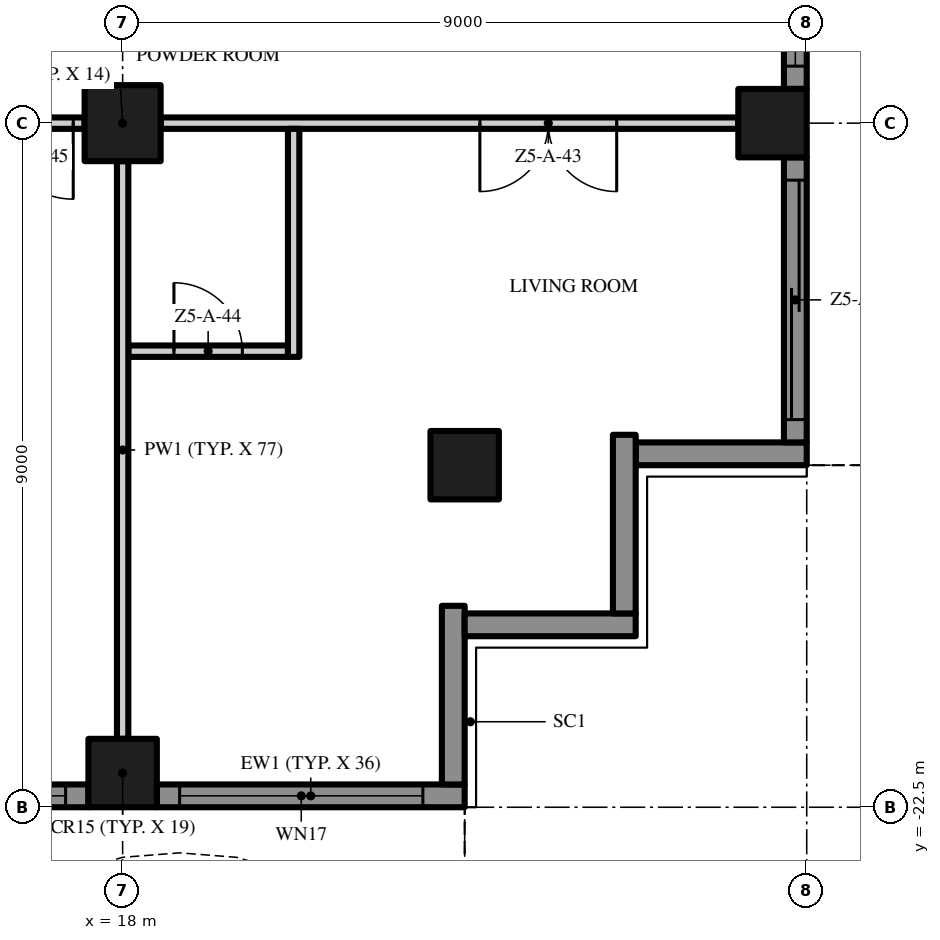
"""IFC4 building model, lengths in metres.
Left out: names, types, materials, properties, quantities, classifications, styles, units other than length and angle.
Written with IfcOpenShell. Run it as: python <this file> out.ifc"""

import sys

from ifc_helpers import new_model, si_unit, direction, frame, frame_2d, origin, origin_2d, place, context, subcontext, project, spatial, polyline, rectangle, outline, extrude, element, fill, save


model = new_model("IFC4")
c1 = context("Model", 3, precision=1e-05, world=origin(), true_north=direction((0.0, 1.0)))
c2 = subcontext(c1, "Body", "Model", "MODEL_VIEW")
j1 = project(units=[si_unit("LENGTHUNIT", "METRE"), si_unit("PLANEANGLEUNIT", "RADIAN")], contexts=[c1])
p1 = place(None, origin())
s1 = spatial("IfcSite", under=j1, at=p1, CompositionType="ELEMENT")
p2 = place(p1, origin())
s2 = spatial("IfcBuilding", under=s1, at=p2, CompositionType="ELEMENT")
p3 = place(p2, frame((0.0, 0.0, 242.6)))
s3 = spatial("IfcBuildingStorey", under=s2, at=p3, CompositionType="ELEMENT", Elevation=242.6)
p4 = place(p3, frame((18.0, -13.5, 0.0), z_axis=(0.0, 0.0, 1.0), x_axis=(1.0, 0.0, 0.0)))
e1 = element("IfcColumn", 1, at=p4, inside=s3, PredefinedType="COLUMN", context=c2, shape_type="SweptSolid", body=[
    extrude(rectangle(XDim=1.0, YDim=1.0, at=origin_2d()), origin(), (0.0, 0.0, 1.0), 3.5),
])
for number, where, z_axis, x_axis in (
    (2, (18.0, -22.05, 0.0), (0.0, 0.0, 1.0), (1.0, 0.0, 0.0)),
    (3, (26.55, -13.5, 0.0), (0.0, 0.0, 1.0), (1.0, 0.0, 0.0)),
    (4, (22.5, -18.0, 0.0), (0.0, 0.0, 1.0), (1.0, 0.0, 0.0)),
):
    element("IfcColumn", number, at=place(p3, frame(where, z_axis=z_axis, x_axis=x_axis)), inside=s3, PredefinedType="COLUMN", context=c2, shape_type="SweptSolid", body=[
        extrude(rectangle(XDim=0.9, YDim=0.9, at=origin_2d()), origin(), (0.0, 0.0, 1.0), 3.5),
    ])
p5 = place(p3, frame((17.55, -22.35, 0.0), z_axis=(0.0, 0.0, 1.0), x_axis=(-1.0, 0.0, 0.0)))
e5 = element("IfcWall", 5, at=p5, inside=s3, PredefinedType="SOLIDWALL", context=c2, shape_type="SweptSolid", body=[
    extrude(rectangle(XDim=8.1, YDim=0.3, at=frame_2d((4.05, 0.0))), origin(), (0.0, 0.0, 1.0), 3.5),
])
p6 = place(p5, frame((4.6, 0.0, 0.0)))
e6 = element("IfcOpeningElement", 6, at=p6, cuts=e5, PredefinedType="OPENING", context=c2, shape_type="SweptSolid", body=[
    extrude(rectangle(XDim=3.2, YDim=2.4, at=frame_2d((1.6, 1.2))), frame((0.0, 0.16, 0.0), z_axis=(0.0, -1.0, 0.0), x_axis=(1.0, 0.0, 0.0)), (0.0, 0.0, 1.0), 0.32),
])
p7 = place(p5, frame((0.3, 0.0, 0.45)))
e7 = element("IfcOpeningElement", 7, at=p7, cuts=e5, PredefinedType="OPENING", context=c2, shape_type="SweptSolid", body=[
    extrude(rectangle(XDim=3.2, YDim=2.65, at=frame_2d((1.6, 1.325))), frame((0.0, 0.16, 0.0), z_axis=(0.0, -1.0, 0.0), x_axis=(1.0, 0.0, 0.0)), (0.0, 0.0, 1.0), 0.32),
])
p8 = place(p3, frame((22.5, -22.35, 0.0), z_axis=(0.0, 0.0, 1.0), x_axis=(-1.0, 0.0, 0.0)))
e8 = element("IfcWall", 8, at=p8, inside=s3, PredefinedType="SOLIDWALL", context=c2, shape_type="SweptSolid", body=[
    extrude(rectangle(XDim=4.05, YDim=0.3, at=frame_2d((2.025, 0.0))), origin(), (0.0, 0.0, 1.0), 3.5),
])
p9 = place(p8, frame((0.55, 0.0, 0.45)))
e9 = element("IfcOpeningElement", 9, at=p9, cuts=e8, PredefinedType="OPENING", context=c2, shape_type="SweptSolid", body=[
    extrude(rectangle(XDim=3.2, YDim=2.65, at=frame_2d((1.6, 1.325))), frame((0.0, 0.16, 0.0), z_axis=(0.0, -1.0, 0.0), x_axis=(1.0, 0.0, 0.0)), (0.0, 0.0, 1.0), 0.32),
])
p10 = place(p3, frame((22.35, -19.85, 0.0), z_axis=(0.0, 0.0, 1.0), x_axis=(0.0, -1.0, 0.0)))
e10 = element("IfcWall", 10, at=p10, inside=s3, PredefinedType="SOLIDWALL", context=c2, shape_type="SweptSolid", body=[
    extrude(rectangle(XDim=2.35, YDim=0.3, at=frame_2d((1.175, 0.0))), origin(), (0.0, 0.0, 1.0), 3.5),
])
p11 = place(p3, frame((24.75, -20.1, 0.0), z_axis=(0.0, 0.0, 1.0), x_axis=(-1.0, 0.0, 0.0)))
e11 = element("IfcWall", 11, at=p11, inside=s3, PredefinedType="SOLIDWALL", context=c2, shape_type="SweptSolid", body=[
    extrude(rectangle(XDim=2.25, YDim=0.3, at=frame_2d((1.125, 0.0))), origin(), (0.0, 0.0, 1.0), 3.5),
])
p12 = place(p3, frame((24.6, -17.6, 0.0), z_axis=(0.0, 0.0, 1.0), x_axis=(0.0, -1.0, 0.0)))
e12 = element("IfcWall", 12, at=p12, inside=s3, PredefinedType="SOLIDWALL", context=c2, shape_type="SweptSolid", body=[
    extrude(rectangle(XDim=2.35, YDim=0.3, at=frame_2d((1.175, 0.0))), origin(), (0.0, 0.0, 1.0), 3.5),
])
p13 = place(p3, frame((27.0, -17.85, 0.0), z_axis=(0.0, 0.0, 1.0), x_axis=(-1.0, 0.0, 0.0)))
e13 = element("IfcWall", 13, at=p13, inside=s3, PredefinedType="SOLIDWALL", context=c2, shape_type="SweptSolid", body=[
    extrude(rectangle(XDim=2.25, YDim=0.3, at=frame_2d((1.125, 0.0))), origin(), (0.0, 0.0, 1.0), 3.5),
])
p14 = place(p3, frame((26.85, -13.95, 0.0), z_axis=(0.0, 0.0, 1.0), x_axis=(0.0, -1.0, 0.0)))
e14 = element("IfcWall", 14, at=p14, inside=s3, PredefinedType="SOLIDWALL", context=c2, shape_type="SweptSolid", body=[
    extrude(rectangle(XDim=3.75, YDim=0.3, at=frame_2d((1.875, 0.0))), origin(), (0.0, 0.0, 1.0), 3.5),
])
p15 = place(p14, frame((0.3, 0.0, 0.0)))
e15 = element("IfcOpeningElement", 15, at=p15, cuts=e14, PredefinedType="OPENING", context=c2, shape_type="SweptSolid", body=[
    extrude(rectangle(XDim=3.15, YDim=2.4, at=frame_2d((1.575, 1.2))), frame((0.0, 0.16, 0.0), z_axis=(0.0, -1.0, 0.0), x_axis=(1.0, 0.0, 0.0)), (0.0, 0.0, 1.0), 0.32),
])
p16 = place(p3, frame((26.85, -4.95, 0.0), z_axis=(0.0, 0.0, 1.0), x_axis=(0.0, -1.0, 0.0)))
e16 = element("IfcWall", 16, at=p16, inside=s3, PredefinedType="SOLIDWALL", context=c2, shape_type="SweptSolid", body=[
    extrude(rectangle(XDim=8.1, YDim=0.3, at=frame_2d((4.05, 0.0))), origin(), (0.0, 0.0, 1.0), 3.5),
])
p17 = place(p16, frame((4.6, 0.0, 0.45)))
e17 = element("IfcOpeningElement", 17, at=p17, cuts=e16, PredefinedType="OPENING", context=c2, shape_type="SweptSolid", body=[
    extrude(rectangle(XDim=3.2, YDim=2.65, at=frame_2d((1.6, 1.325))), frame((0.0, 0.16, 0.0), z_axis=(0.0, -1.0, 0.0), x_axis=(1.0, 0.0, 0.0)), (0.0, 0.0, 1.0), 0.32),
])
p18 = place(p16, frame((0.3, 0.0, 0.45)))
e18 = element("IfcOpeningElement", 18, at=p18, cuts=e16, PredefinedType="OPENING", context=c2, shape_type="SweptSolid", body=[
    extrude(rectangle(XDim=3.2, YDim=2.65, at=frame_2d((1.6, 1.325))), frame((0.0, 0.16, 0.0), z_axis=(0.0, -1.0, 0.0), x_axis=(1.0, 0.0, 0.0)), (0.0, 0.0, 1.0), 0.32),
])
p19 = place(p3, origin())
e19 = element("IfcWall", 19, at=p19, inside=s3, PredefinedType="USERDEFINED", context=c2, shape_type="SweptSolid", body=[
    extrude(outline(polyline([(-22.5, -24.3), (-21.0, -25.005), (-19.5, -25.441), (-18.75, -25.5), (-18.0, -25.441), (-16.5, -25.005), (-15.0, -24.3), (-13.5, -23.595), (-12.0, -23.159), (-11.25, -23.1), (-10.5, -23.159), (-9.0, -23.595), (-7.5, -24.3), (-6.0, -25.005), (-4.5, -25.441), (-3.75, -25.5), (-3.0, -25.441), (-1.5, -25.005), (0.0, -24.3), (1.5, -23.595), (3.0, -23.159), (3.75, -23.1), (4.5, -23.159), (6.0, -23.595), (7.5, -24.3), (9.0, -25.005), (10.5, -25.441), (11.25, -25.5), (12.0, -25.441), (13.5, -25.005), (15.0, -24.3), (16.5, -23.595), (18.0, -23.159), (18.75, -23.1), (19.5, -23.159), (21.0, -23.595), (22.5, -24.3), (22.606, -24.074), (21.089, -23.36), (19.545, -22.911), (18.75, -22.849), (17.955, -22.911), (16.411, -23.36), (14.894, -24.074), (13.411, -24.771), (11.955, -25.194), (11.25, -25.249), (10.545, -25.194), (9.089, -24.771), (7.606, -24.074), (6.089, -23.36), (4.545, -22.911), (3.75, -22.849), (2.955, -22.911), (1.411, -23.36), (-0.106, -24.074), (-1.589, -24.771), (-3.045, -25.194), (-3.75, -25.249), (-4.455, -25.194), (-5.911, -24.771), (-7.394, -24.074), (-8.911, -23.36), (-10.455, -22.911), (-11.25, -22.849), (-12.045, -22.911), (-13.589, -23.36), (-15.106, -24.074), (-16.589, -24.771), (-18.045, -25.194), (-18.75, -25.249), (-19.455, -25.194), (-20.911, -24.771), (-22.394, -24.074), (-22.5, -24.3)])), origin(), (0.0, 0.0, 1.0), 0.9),
])
p20 = place(p3, origin())
e20 = element("IfcWall", 20, at=p20, inside=s3, PredefinedType="USERDEFINED", context=c2, shape_type="SweptSolid", body=[
    extrude(outline(polyline([(28.8, -18.0), (29.505, -16.5), (29.941, -15.0), (30.0, -14.25), (29.941, -13.5), (29.505, -12.0), (28.8, -10.5), (28.095, -9.0), (27.659, -7.5), (27.6, -6.75), (27.659, -6.0), (28.095, -4.5), (28.8, -3.0), (29.505, -1.5), (29.941, 0.0), (30.0, 0.75), (29.941, 1.5), (29.505, 3.0), (28.8, 4.5), (28.095, 6.0), (27.659, 7.5), (27.6, 8.25), (27.659, 9.0), (28.095, 10.5), (28.8, 12.0), (29.505, 13.5), (29.941, 15.0), (30.0, 15.75), (29.941, 16.5), (29.505, 18.0), (29.265, 17.93), (29.694, 16.455), (29.749, 15.75), (29.694, 15.045), (29.271, 13.589), (28.574, 12.106), (27.86, 10.589), (27.411, 9.045), (27.349, 8.25), (27.411, 7.455), (27.86, 5.911), (28.574, 4.394), (29.271, 2.911), (29.694, 1.455), (29.749, 0.75), (29.694, 0.045), (29.271, -1.411), (28.574, -2.894), (27.86, -4.411), (27.411, -5.955), (27.349, -6.75), (27.411, -7.545), (27.86, -9.089), (28.574, -10.606), (29.271, -12.089), (29.694, -13.545), (29.749, -14.25), (29.694, -14.955), (29.271, -16.411), (28.574, -17.894), (28.8, -18.0)])), origin(), (0.0, 0.0, 1.0), 0.9),
])
p21 = place(p3, frame((18.075, -16.5, 0.0), z_axis=(0.0, 0.0, 1.0), x_axis=(1.0, 0.0, 0.0)))
e21 = element("IfcWall", 21, at=p21, inside=s3, PredefinedType="PARTITIONING", context=c2, shape_type="SweptSolid", body=[
    extrude(rectangle(XDim=2.1, YDim=0.15, at=frame_2d((1.05, 0.0))), origin(), (0.0, 0.0, 1.0), 3.5),
])
p22 = place(p21, frame((0.6, 0.0, 0.0)))
e22 = element("IfcOpeningElement", 22, at=p22, cuts=e21, PredefinedType="OPENING", context=c2, shape_type="SweptSolid", body=[
    extrude(rectangle(XDim=0.9, YDim=2.1, at=frame_2d((0.45, 1.05))), frame((0.0, 0.085, 0.0), z_axis=(0.0, -1.0, 0.0), x_axis=(1.0, 0.0, 0.0)), (0.0, 0.0, 1.0), 0.17),
])
p23 = place(p3, frame((17.5, -13.5, 0.0), z_axis=(0.0, 0.0, 1.0), x_axis=(-1.0, 0.0, 0.0)))
e23 = element("IfcWall", 23, at=p23, inside=s3, PredefinedType="PARTITIONING", context=c2, shape_type="SweptSolid", body=[
    extrude(rectangle(XDim=8.0, YDim=0.15, at=frame_2d((4.0, 0.0))), origin(), (0.0, 0.0, 1.0), 3.5),
])
p24 = place(p23, frame((0.15, 0.0, 0.0)))
e24 = element("IfcOpeningElement", 24, at=p24, cuts=e23, PredefinedType="OPENING", context=c2, shape_type="SweptSolid", body=[
    extrude(rectangle(XDim=1.0, YDim=2.4, at=frame_2d((0.5, 1.2))), frame((0.0, 0.085, 0.0), z_axis=(0.0, -1.0, 0.0), x_axis=(1.0, 0.0, 0.0)), (0.0, 0.0, 1.0), 0.17),
])
p25 = place(p23, frame((6.85, 0.0, 0.0)))
e25 = element("IfcOpeningElement", 25, at=p25, cuts=e23, PredefinedType="OPENING", context=c2, shape_type="SweptSolid", body=[
    extrude(rectangle(XDim=1.0, YDim=2.4, at=frame_2d((0.5, 1.2))), frame((0.0, 0.085, 0.0), z_axis=(0.0, -1.0, 0.0), x_axis=(1.0, 0.0, 0.0)), (0.0, 0.0, 1.0), 0.17),
])
p26 = place(p3, frame((26.1, -13.5, 0.0), z_axis=(0.0, 0.0, 1.0), x_axis=(-1.0, 0.0, 0.0)))
e26 = element("IfcWall", 26, at=p26, inside=s3, PredefinedType="PARTITIONING", context=c2, shape_type="SweptSolid", body=[
    extrude(rectangle(XDim=7.6, YDim=0.15, at=frame_2d((3.8, 0.0))), origin(), (0.0, 0.0, 1.0), 3.5),
])
p27 = place(p26, frame((1.6, 0.0, 0.0)))
e27 = element("IfcOpeningElement", 27, at=p27, cuts=e26, PredefinedType="OPENING", context=c2, shape_type="SweptSolid", body=[
    extrude(rectangle(XDim=1.8, YDim=2.4, at=frame_2d((0.9, 1.2))), frame((0.0, 0.085, 0.0), z_axis=(0.0, -1.0, 0.0), x_axis=(1.0, 0.0, 0.0)), (0.0, 0.0, 1.0), 0.17),
])
p28 = place(p3, frame((18.0, -21.6, 0.0), z_axis=(0.0, 0.0, 1.0), x_axis=(0.0, 1.0, 0.0)))
e28 = element("IfcWall", 28, at=p28, inside=s3, PredefinedType="PARTITIONING", context=c2, shape_type="SweptSolid", body=[
    extrude(rectangle(XDim=7.6, YDim=0.15, at=frame_2d((3.8, 0.0))), origin(), (0.0, 0.0, 1.0), 3.5),
])
p29 = place(p3, frame((20.25, -16.575, 0.0), z_axis=(0.0, 0.0, 1.0), x_axis=(0.0, 1.0, 0.0)))
e29 = element("IfcWall", 29, at=p29, inside=s3, PredefinedType="PARTITIONING", context=c2, shape_type="SweptSolid", body=[
    extrude(rectangle(XDim=3.0, YDim=0.15, at=frame_2d((1.5, 0.0))), origin(), (0.0, 0.0, 1.0), 3.5),
])
p30 = place(p7, origin())
e30 = element("IfcWindow", 30, at=p30, inside=s3, PartitioningType="SINGLE_PANEL", PredefinedType="WINDOW", context=c2, shape_type="SweptSolid", body=[
    extrude(rectangle(XDim=3.2, YDim=2.65, at=frame_2d((1.6, 1.325))), frame((0.0, 0.03, 0.0), z_axis=(0.0, -1.0, 0.0), x_axis=(1.0, 0.0, 0.0)), (0.0, 0.0, 1.0), 0.06),
])
fill(e7, e30)
p31 = place(p9, origin())
e31 = element("IfcWindow", 31, at=p31, inside=s3, PartitioningType="SINGLE_PANEL", PredefinedType="WINDOW", context=c2, shape_type="SweptSolid", body=[
    extrude(rectangle(XDim=3.2, YDim=2.65, at=frame_2d((1.6, 1.325))), frame((0.0, 0.03, 0.0), z_axis=(0.0, -1.0, 0.0), x_axis=(1.0, 0.0, 0.0)), (0.0, 0.0, 1.0), 0.06),
])
fill(e9, e31)
p32 = place(p15, origin())
e32 = element("IfcDoor", 32, at=p32, inside=s3, OperationType="SINGLE_SWING_LEFT", PredefinedType="DOOR", context=c2, shape_type="SweptSolid", body=[
    extrude(rectangle(XDim=3.15, YDim=2.4, at=frame_2d((1.575, 1.2))), frame((0.0, 0.025, 0.0), z_axis=(0.0, -1.0, 0.0), x_axis=(1.0, 0.0, 0.0)), (0.0, 0.0, 1.0), 0.05),
])
fill(e15, e32)
p33 = place(p17, origin())
e33 = element("IfcWindow", 33, at=p33, inside=s3, PartitioningType="SINGLE_PANEL", PredefinedType="WINDOW", context=c2, shape_type="SweptSolid", body=[
    extrude(rectangle(XDim=3.2, YDim=2.65, at=frame_2d((1.6, 1.325))), frame((0.0, 0.03, 0.0), z_axis=(0.0, -1.0, 0.0), x_axis=(1.0, 0.0, 0.0)), (0.0, 0.0, 1.0), 0.06),
])
fill(e17, e33)
p34 = place(p27, origin())
e34 = element("IfcDoor", 34, at=p34, inside=s3, OperationType="DOUBLE_DOOR_SINGLE_SWING", PredefinedType="DOOR", context=c2, shape_type="SweptSolid", body=[
    extrude(rectangle(XDim=1.8, YDim=2.4, at=frame_2d((0.9, 1.2))), frame((0.0, 0.025, 0.0), z_axis=(0.0, -1.0, 0.0), x_axis=(1.0, 0.0, 0.0)), (0.0, 0.0, 1.0), 0.05),
])
fill(e27, e34)
p35 = place(p22, origin())
e35 = element("IfcDoor", 35, at=p35, inside=s3, OperationType="SINGLE_SWING_LEFT", PredefinedType="DOOR", context=c2, shape_type="SweptSolid", body=[
    extrude(rectangle(XDim=0.9, YDim=2.1, at=frame_2d((0.45, 1.05))), frame((0.0, 0.025, 0.0), z_axis=(0.0, -1.0, 0.0), x_axis=(1.0, 0.0, 0.0)), (0.0, 0.0, 1.0), 0.05),
])
fill(e22, e35)
p36 = place(p24, origin())
e36 = element("IfcDoor", 36, at=p36, inside=s3, OperationType="SINGLE_SWING_LEFT", PredefinedType="DOOR", context=c2, shape_type="SweptSolid", body=[
    extrude(rectangle(XDim=1.0, YDim=2.4, at=frame_2d((0.5, 1.2))), frame((0.0, 0.025, 0.0), z_axis=(0.0, -1.0, 0.0), x_axis=(1.0, 0.0, 0.0)), (0.0, 0.0, 1.0), 0.05),
])
fill(e24, e36)
save(model, sys.argv[1])
